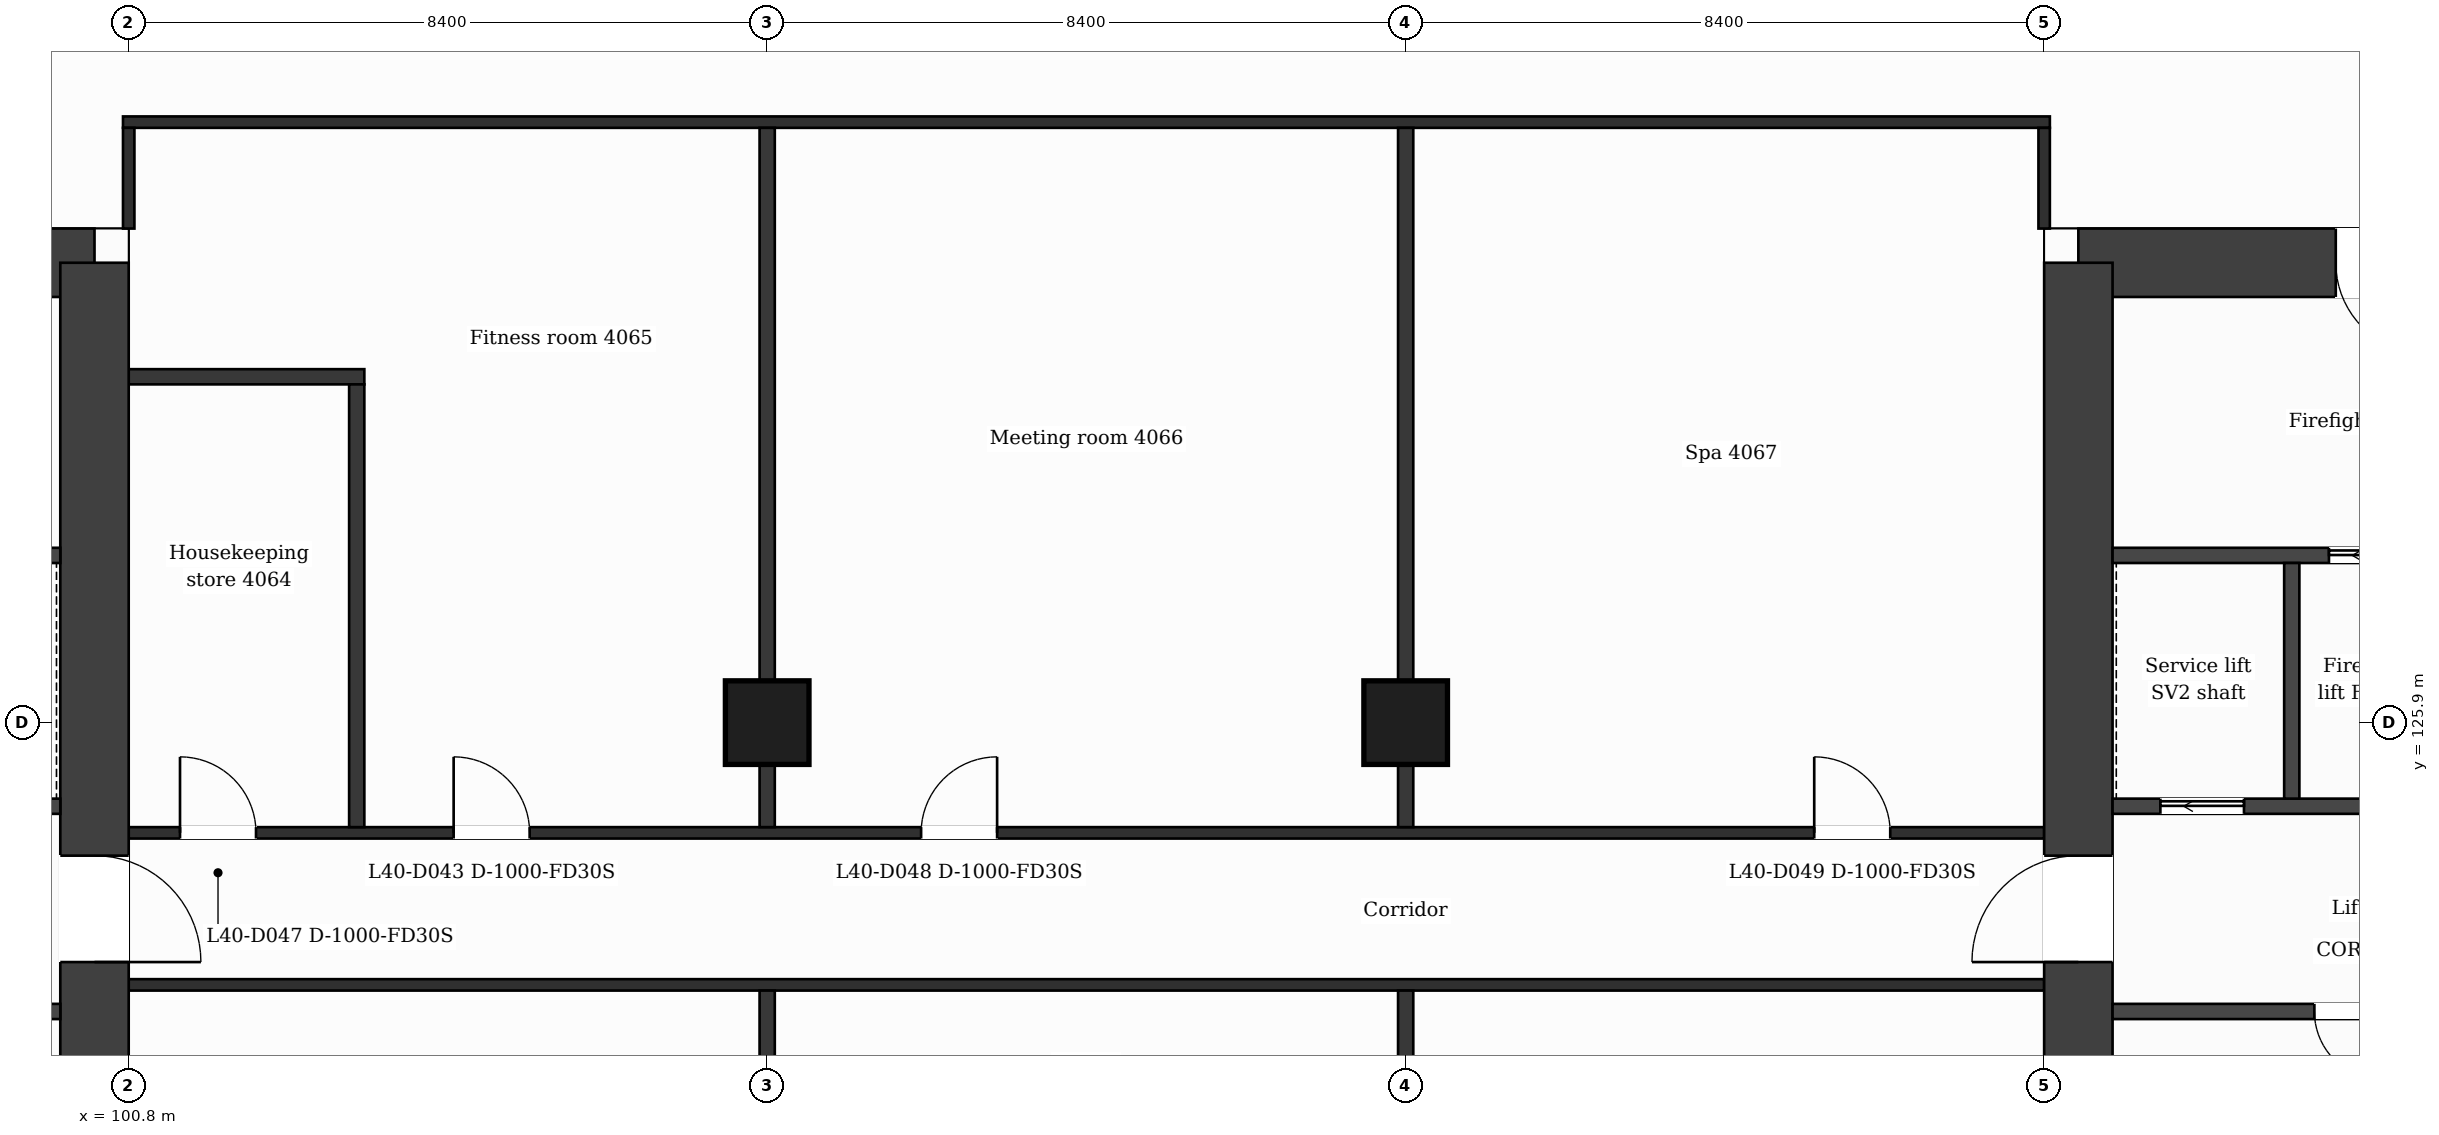
"""IFC4 building model, lengths in metres.
Left out: names, types, materials, properties, quantities, classifications, styles, units other than length and angle.
Written with IfcOpenShell. Run it as: python <this file> out.ifc"""

import sys

from ifc_helpers import new_model, si_unit, direction, frame, frame_2d, origin, origin_2d, place, context, subcontext, project, spatial, rectangle, extrude, element, fill, save


model = new_model("IFC4")
c1 = context("Model", 3, precision=1e-05, world=origin(), true_north=direction((0.0, 1.0)))
c2 = subcontext(c1, "Body", "Model", "MODEL_VIEW")
j1 = project(units=[si_unit("LENGTHUNIT", "METRE"), si_unit("PLANEANGLEUNIT", "RADIAN")], contexts=[c1])
p1 = place(None, origin())
s1 = spatial("IfcSite", under=j1, at=p1, CompositionType="ELEMENT")
p2 = place(p1, origin())
s2 = spatial("IfcBuilding", under=s1, at=p2, CompositionType="ELEMENT")
p3 = place(p2, frame((0.0, 0.0, 170.0)))
s3 = spatial("IfcBuildingStorey", under=s2, at=p3, CompositionType="ELEMENT", Elevation=170.0)
p4 = place(p3, frame((89.024, 131.95, 0.0), z_axis=(0.0, 0.0, 1.0), x_axis=(1.0, 0.0, 0.0)))
e1 = element("IfcWall", 1, at=p4, inside=s3, PredefinedType="SHEAR", context=c2, shape_type="SweptSolid", body=[
    extrude(rectangle(XDim=11.326, YDim=0.9, at=frame_2d((5.663, 0.0))), origin(), (0.0, 0.0, 1.0), 3.7),
])
p5 = place(p4, frame((6.739, 0.0, 0.0)))
e2 = element("IfcOpeningElement", 2, at=p5, cuts=e1, PredefinedType="OPENING", context=c2, shape_type="SweptSolid", body=[
    extrude(rectangle(XDim=1.2, YDim=2.1, at=frame_2d((0.6, 1.05))), frame((0.0, 0.46, 0.0), z_axis=(0.0, -1.0, 0.0), x_axis=(1.0, 0.0, 0.0)), (0.0, 0.0, 1.0), 0.92),
])
p6 = place(p3, frame((100.35, 131.95, 0.0), z_axis=(0.0, 0.0, 1.0), x_axis=(0.0, -1.0, 0.0)))
e3 = element("IfcWall", 3, at=p6, inside=s3, PredefinedType="SHEAR", context=c2, shape_type="SweptSolid", body=[
    extrude(rectangle(XDim=21.1, YDim=0.9, at=frame_2d((10.55, 0.0))), origin(), (0.0, 0.0, 1.0), 3.7),
])
p7 = place(p6, frame((7.8, 0.0, 0.0)))
e4 = element("IfcOpeningElement", 4, at=p7, cuts=e3, PredefinedType="OPENING", context=c2, shape_type="SweptSolid", body=[
    extrude(rectangle(XDim=1.4, YDim=2.1, at=frame_2d((0.7, 1.05))), frame((0.0, 0.46, 0.0), z_axis=(0.0, -1.0, 0.0), x_axis=(1.0, 0.0, 0.0)), (0.0, 0.0, 1.0), 0.92),
])
p8 = place(p3, frame((126.45, 131.95, 0.0), z_axis=(0.0, 0.0, 1.0), x_axis=(1.0, 0.0, 0.0)))
e5 = element("IfcWall", 5, at=p8, inside=s3, PredefinedType="SHEAR", context=c2, shape_type="SweptSolid", body=[
    extrude(rectangle(XDim=11.326, YDim=0.9, at=frame_2d((5.663, 0.0))), origin(), (0.0, 0.0, 1.0), 3.7),
])
p9 = place(p8, frame((3.386, 0.0, 0.0)))
e6 = element("IfcOpeningElement", 6, at=p9, cuts=e5, PredefinedType="OPENING", context=c2, shape_type="SweptSolid", body=[
    extrude(rectangle(XDim=1.2, YDim=2.1, at=frame_2d((0.6, 1.05))), frame((0.0, 0.46, 0.0), z_axis=(0.0, -1.0, 0.0), x_axis=(1.0, 0.0, 0.0)), (0.0, 0.0, 1.0), 0.92),
])
p10 = place(p3, frame((126.45, 110.85, 0.0), z_axis=(0.0, 0.0, 1.0), x_axis=(0.0, 1.0, 0.0)))
e7 = element("IfcWall", 7, at=p10, inside=s3, PredefinedType="SHEAR", context=c2, shape_type="SweptSolid", body=[
    extrude(rectangle(XDim=21.1, YDim=0.9, at=frame_2d((10.55, 0.0))), origin(), (0.0, 0.0, 1.0), 3.7),
])
p11 = place(p10, frame((11.9, 0.0, 0.0)))
e8 = element("IfcOpeningElement", 8, at=p11, cuts=e7, PredefinedType="OPENING", context=c2, shape_type="SweptSolid", body=[
    extrude(rectangle(XDim=1.4, YDim=2.1, at=frame_2d((0.7, 1.05))), frame((0.0, 0.46, 0.0), z_axis=(0.0, -1.0, 0.0), x_axis=(1.0, 0.0, 0.0)), (0.0, 0.0, 1.0), 0.92),
])
for number, where, z_axis, x_axis in (
    (9, (109.2, 125.9, 0.0), (0.0, 0.0, 1.0), (1.0, 0.0, 0.0)),
    (10, (117.6, 125.9, 0.0), (0.0, 0.0, 1.0), (1.0, 0.0, 0.0)),
):
    element("IfcColumn", number, at=place(p3, frame(where, z_axis=z_axis, x_axis=x_axis)), inside=s3, PredefinedType="COLUMN", context=c2, shape_type="SweptSolid", body=[
        extrude(rectangle(XDim=1.1, YDim=1.1, at=origin_2d()), origin(), (0.0, 0.0, 1.0), 3.7),
    ])
p12 = place(p3, frame((95.227, 122.1, 0.0), z_axis=(0.0, 0.0, 1.0), x_axis=(1.0, 0.0, 0.0)))
e11 = element("IfcWall", 11, at=p12, inside=s3, PredefinedType="PARTITIONING", context=c2, shape_type="SweptSolid", body=[
    extrude(rectangle(XDim=4.673, YDim=0.2, at=frame_2d((2.336, 0.0))), origin(), (0.0, 0.0, 1.0), 3.38),
])
p13 = place(p12, frame((2.655, 0.0, 0.0)))
e12 = element("IfcOpeningElement", 12, at=p13, cuts=e11, PredefinedType="OPENING", context=c2, shape_type="SweptSolid", body=[
    extrude(rectangle(XDim=0.9, YDim=2.1, at=frame_2d((0.45, 1.05))), frame((0.0, 0.11, 0.0), z_axis=(0.0, -1.0, 0.0), x_axis=(1.0, 0.0, 0.0)), (0.0, 0.0, 1.0), 0.22),
])
p14 = place(p3, frame((126.9, 122.1, 0.0), z_axis=(0.0, 0.0, 1.0), x_axis=(1.0, 0.0, 0.0)))
e13 = element("IfcWall", 13, at=p14, inside=s3, PredefinedType="PARTITIONING", context=c2, shape_type="SweptSolid", body=[
    extrude(rectangle(XDim=4.673, YDim=0.2, at=frame_2d((2.336, 0.0))), origin(), (0.0, 0.0, 1.0), 3.38),
])
p15 = place(p14, frame((2.655, 0.0, 0.0)))
e14 = element("IfcOpeningElement", 14, at=p15, cuts=e13, PredefinedType="OPENING", context=c2, shape_type="SweptSolid", body=[
    extrude(rectangle(XDim=0.9, YDim=2.1, at=frame_2d((0.45, 1.05))), frame((0.0, 0.11, 0.0), z_axis=(0.0, -1.0, 0.0), x_axis=(1.0, 0.0, 0.0)), (0.0, 0.0, 1.0), 0.22),
])
p16 = place(p3, frame((100.8, 122.45, 0.0), z_axis=(0.0, 0.0, 1.0), x_axis=(1.0, 0.0, 0.0)))
e15 = element("IfcWall", 15, at=p16, inside=s3, PredefinedType="PARTITIONING", context=c2, shape_type="SweptSolid", body=[
    extrude(rectangle(XDim=25.2, YDim=0.15, at=frame_2d((12.6, 0.0))), origin(), (0.0, 0.0, 1.0), 3.38),
])
p17 = place(p3, frame((100.8, 124.45, 0.0), z_axis=(0.0, 0.0, 1.0), x_axis=(1.0, 0.0, 0.0)))
e16 = element("IfcWall", 16, at=p17, inside=s3, PredefinedType="PARTITIONING", context=c2, shape_type="SweptSolid", body=[
    extrude(rectangle(XDim=25.2, YDim=0.15, at=frame_2d((12.6, 0.0))), origin(), (0.0, 0.0, 1.0), 3.38),
])
p18 = place(p17, frame((4.275, 0.0, 0.0)))
e17 = element("IfcOpeningElement", 17, at=p18, cuts=e16, PredefinedType="OPENING", context=c2, shape_type="SweptSolid", body=[
    extrude(rectangle(XDim=1.0, YDim=2.1, at=frame_2d((0.5, 1.05))), frame((0.0, 0.085, 0.0), z_axis=(0.0, -1.0, 0.0), x_axis=(1.0, 0.0, 0.0)), (0.0, 0.0, 1.0), 0.17),
])
p19 = place(p17, frame((0.675, 0.0, 0.0)))
e18 = element("IfcOpeningElement", 18, at=p19, cuts=e16, PredefinedType="OPENING", context=c2, shape_type="SweptSolid", body=[
    extrude(rectangle(XDim=1.0, YDim=2.1, at=frame_2d((0.5, 1.05))), frame((0.0, 0.085, 0.0), z_axis=(0.0, -1.0, 0.0), x_axis=(1.0, 0.0, 0.0)), (0.0, 0.0, 1.0), 0.17),
])
p20 = place(p17, frame((10.425, 0.0, 0.0)))
e19 = element("IfcOpeningElement", 19, at=p20, cuts=e16, PredefinedType="OPENING", context=c2, shape_type="SweptSolid", body=[
    extrude(rectangle(XDim=1.0, YDim=2.1, at=frame_2d((0.5, 1.05))), frame((0.0, 0.085, 0.0), z_axis=(0.0, -1.0, 0.0), x_axis=(1.0, 0.0, 0.0)), (0.0, 0.0, 1.0), 0.17),
])
p21 = place(p17, frame((22.175, 0.0, 0.0)))
e20 = element("IfcOpeningElement", 20, at=p21, cuts=e16, PredefinedType="OPENING", context=c2, shape_type="SweptSolid", body=[
    extrude(rectangle(XDim=1.0, YDim=2.1, at=frame_2d((0.5, 1.05))), frame((0.0, 0.085, 0.0), z_axis=(0.0, -1.0, 0.0), x_axis=(1.0, 0.0, 0.0)), (0.0, 0.0, 1.0), 0.17),
])
p22 = place(p3, frame((92.702, 124.8, 0.0), z_axis=(0.0, 0.0, 1.0), x_axis=(1.0, 0.0, 0.0)))
e21 = element("IfcWall", 21, at=p22, inside=s3, PredefinedType="PARTITIONING", context=c2, shape_type="SweptSolid", body=[
    extrude(rectangle(XDim=7.198, YDim=0.2, at=frame_2d((3.599, 0.0))), origin(), (0.0, 0.0, 1.0), 3.38),
])
p23 = place(p22, frame((5.469, 0.0, 0.0)))
e22 = element("IfcOpeningElement", 22, at=p23, cuts=e21, PredefinedType="OPENING", context=c2, shape_type="SweptSolid", body=[
    extrude(rectangle(XDim=1.1, YDim=2.1, at=frame_2d((0.55, 1.05))), frame((0.0, 0.11, 0.0), z_axis=(0.0, -1.0, 0.0), x_axis=(1.0, 0.0, 0.0)), (0.0, 0.0, 1.0), 0.22),
])
p24 = place(p3, frame((126.9, 124.8, 0.0), z_axis=(0.0, 0.0, 1.0), x_axis=(1.0, 0.0, 0.0)))
e23 = element("IfcWall", 23, at=p24, inside=s3, PredefinedType="PARTITIONING", context=c2, shape_type="SweptSolid", body=[
    extrude(rectangle(XDim=4.715, YDim=0.2, at=frame_2d((2.358, 0.0))), origin(), (0.0, 0.0, 1.0), 3.38),
])
p25 = place(p24, frame((0.629, 0.0, 0.0)))
e24 = element("IfcOpeningElement", 24, at=p25, cuts=e23, PredefinedType="OPENING", context=c2, shape_type="SweptSolid", body=[
    extrude(rectangle(XDim=1.1, YDim=2.1, at=frame_2d((0.55, 1.05))), frame((0.0, 0.11, 0.0), z_axis=(0.0, -1.0, 0.0), x_axis=(1.0, 0.0, 0.0)), (0.0, 0.0, 1.0), 0.22),
])
p26 = place(p3, frame((92.827, 128.1, 0.0), z_axis=(0.0, 0.0, 1.0), x_axis=(1.0, 0.0, 0.0)))
e25 = element("IfcWall", 25, at=p26, inside=s3, PredefinedType="PARTITIONING", context=c2, shape_type="SweptSolid", body=[
    extrude(rectangle(XDim=7.073, YDim=0.2, at=frame_2d((3.537, 0.0))), origin(), (0.0, 0.0, 1.0), 3.38),
])
p27 = place(p26, frame((2.931, 0.0, 0.0)))
e26 = element("IfcOpeningElement", 26, at=p27, cuts=e25, PredefinedType="OPENING", context=c2, shape_type="SweptSolid", body=[
    extrude(rectangle(XDim=1.1, YDim=2.1, at=frame_2d((0.55, 1.05))), frame((0.0, 0.11, 0.0), z_axis=(0.0, -1.0, 0.0), x_axis=(1.0, 0.0, 0.0)), (0.0, 0.0, 1.0), 0.22),
])
p28 = place(p3, frame((126.9, 128.1, 0.0), z_axis=(0.0, 0.0, 1.0), x_axis=(1.0, 0.0, 0.0)))
e27 = element("IfcWall", 27, at=p28, inside=s3, PredefinedType="PARTITIONING", context=c2, shape_type="SweptSolid", body=[
    extrude(rectangle(XDim=4.715, YDim=0.2, at=frame_2d((2.358, 0.0))), origin(), (0.0, 0.0, 1.0), 3.38),
])
p29 = place(p28, frame((2.847, 0.0, 0.0)))
e28 = element("IfcOpeningElement", 28, at=p29, cuts=e27, PredefinedType="OPENING", context=c2, shape_type="SweptSolid", body=[
    extrude(rectangle(XDim=1.1, YDim=2.1, at=frame_2d((0.55, 1.05))), frame((0.0, 0.11, 0.0), z_axis=(0.0, -1.0, 0.0), x_axis=(1.0, 0.0, 0.0)), (0.0, 0.0, 1.0), 0.22),
])
p30 = place(p3, frame((100.8, 130.45, 0.0), z_axis=(0.0, 0.0, 1.0), x_axis=(1.0, 0.0, 0.0)))
e29 = element("IfcWall", 29, at=p30, inside=s3, PredefinedType="PARTITIONING", context=c2, shape_type="SweptSolid", body=[
    extrude(rectangle(XDim=3.1, YDim=0.2, at=frame_2d((1.55, 0.0))), origin(), (0.0, 0.0, 1.0), 3.38),
])
p31 = place(p3, frame((100.725, 133.8, 0.0), z_axis=(0.0, 0.0, 1.0), x_axis=(1.0, 0.0, 0.0)))
e30 = element("IfcWall", 30, at=p31, inside=s3, PredefinedType="PARTITIONING", context=c2, shape_type="SweptSolid", body=[
    extrude(rectangle(XDim=25.35, YDim=0.15, at=frame_2d((12.675, 0.0))), origin(), (0.0, 0.0, 1.0), 3.38),
])
p32 = place(p3, frame((100.8, 132.4, 0.0), z_axis=(0.0, 0.0, 1.0), x_axis=(0.0, 1.0, 0.0)))
e31 = element("IfcWall", 31, at=p32, inside=s3, PredefinedType="PARTITIONING", context=c2, shape_type="SweptSolid", body=[
    extrude(rectangle(XDim=1.325, YDim=0.15, at=frame_2d((0.663, 0.0))), origin(), (0.0, 0.0, 1.0), 3.38),
])
p33 = place(p3, frame((103.8, 124.525, 0.0), z_axis=(0.0, 0.0, 1.0), x_axis=(0.0, 1.0, 0.0)))
e32 = element("IfcWall", 32, at=p33, inside=s3, PredefinedType="PARTITIONING", context=c2, shape_type="SweptSolid", body=[
    extrude(rectangle(XDim=5.825, YDim=0.2, at=frame_2d((2.913, 0.0))), origin(), (0.0, 0.0, 1.0), 3.38),
])
p34 = place(p3, frame((109.2, 109.075, 0.0), z_axis=(0.0, 0.0, 1.0), x_axis=(0.0, 1.0, 0.0)))
e33 = element("IfcWall", 33, at=p34, inside=s3, PredefinedType="PARTITIONING", context=c2, shape_type="SweptSolid", body=[
    extrude(rectangle(XDim=13.3, YDim=0.2, at=frame_2d((6.65, 0.0))), origin(), (0.0, 0.0, 1.0), 3.38),
])
p35 = place(p3, frame((109.2, 124.525, 0.0), z_axis=(0.0, 0.0, 1.0), x_axis=(0.0, 1.0, 0.0)))
e34 = element("IfcWall", 34, at=p35, inside=s3, PredefinedType="PARTITIONING", context=c2, shape_type="SweptSolid", body=[
    extrude(rectangle(XDim=9.2, YDim=0.2, at=frame_2d((4.6, 0.0))), origin(), (0.0, 0.0, 1.0), 3.38),
])
p36 = place(p3, frame((117.6, 109.075, 0.0), z_axis=(0.0, 0.0, 1.0), x_axis=(0.0, 1.0, 0.0)))
e35 = element("IfcWall", 35, at=p36, inside=s3, PredefinedType="PARTITIONING", context=c2, shape_type="SweptSolid", body=[
    extrude(rectangle(XDim=13.3, YDim=0.2, at=frame_2d((6.65, 0.0))), origin(), (0.0, 0.0, 1.0), 3.38),
])
p37 = place(p3, frame((117.6, 124.525, 0.0), z_axis=(0.0, 0.0, 1.0), x_axis=(0.0, 1.0, 0.0)))
e36 = element("IfcWall", 36, at=p37, inside=s3, PredefinedType="PARTITIONING", context=c2, shape_type="SweptSolid", body=[
    extrude(rectangle(XDim=9.2, YDim=0.2, at=frame_2d((4.6, 0.0))), origin(), (0.0, 0.0, 1.0), 3.38),
])
p38 = place(p3, frame((126.0, 132.4, 0.0), z_axis=(0.0, 0.0, 1.0), x_axis=(0.0, 1.0, 0.0)))
e37 = element("IfcWall", 37, at=p38, inside=s3, PredefinedType="PARTITIONING", context=c2, shape_type="SweptSolid", body=[
    extrude(rectangle(XDim=1.325, YDim=0.15, at=frame_2d((0.663, 0.0))), origin(), (0.0, 0.0, 1.0), 3.38),
])
p39 = place(p3, frame((129.258, 124.9, 0.0), z_axis=(0.0, 0.0, 1.0), x_axis=(0.0, 1.0, 0.0)))
e38 = element("IfcWall", 38, at=p39, inside=s3, PredefinedType="PARTITIONING", context=c2, shape_type="SweptSolid", body=[
    extrude(rectangle(XDim=3.1, YDim=0.2, at=frame_2d((1.55, 0.0))), origin(), (0.0, 0.0, 1.0), 3.38),
])
p40 = place(p29, origin())
e39 = element("IfcDoor", 39, at=p40, inside=s3, OperationType="SLIDING_TO_LEFT", PredefinedType="DOOR", context=c2, shape_type="SweptSolid", body=[
    extrude(rectangle(XDim=1.1, YDim=2.1, at=frame_2d((0.55, 1.05))), frame((0.0, 0.025, 0.0), z_axis=(0.0, -1.0, 0.0), x_axis=(1.0, 0.0, 0.0)), (0.0, 0.0, 1.0), 0.05),
])
fill(e28, e39)
p41 = place(p25, origin())
e40 = element("IfcDoor", 40, at=p41, inside=s3, OperationType="SLIDING_TO_LEFT", PredefinedType="DOOR", context=c2, shape_type="SweptSolid", body=[
    extrude(rectangle(XDim=1.1, YDim=2.1, at=frame_2d((0.55, 1.05))), frame((0.0, 0.025, 0.0), z_axis=(0.0, -1.0, 0.0), x_axis=(1.0, 0.0, 0.0)), (0.0, 0.0, 1.0), 0.05),
])
fill(e24, e40)
p42 = place(p15, origin())
e41 = element("IfcDoor", 41, at=p42, inside=s3, OperationType="SINGLE_SWING_RIGHT", PredefinedType="DOOR", context=c2, shape_type="SweptSolid", body=[
    extrude(rectangle(XDim=0.9, YDim=2.1, at=frame_2d((0.45, 1.05))), frame((0.0, 0.025, 0.0), z_axis=(0.0, -1.0, 0.0), x_axis=(1.0, 0.0, 0.0)), (0.0, 0.0, 1.0), 0.05),
])
fill(e14, e41)
p43 = place(p18, origin())
e42 = element("IfcDoor", 42, at=p43, inside=s3, OperationType="SINGLE_SWING_LEFT", PredefinedType="DOOR", context=c2, shape_type="SweptSolid", body=[
    extrude(rectangle(XDim=1.0, YDim=2.1, at=frame_2d((0.5, 1.05))), frame((0.0, 0.025, 0.0), z_axis=(0.0, -1.0, 0.0), x_axis=(1.0, 0.0, 0.0)), (0.0, 0.0, 1.0), 0.05),
])
fill(e17, e42)
p44 = place(p19, origin())
e43 = element("IfcDoor", 43, at=p44, inside=s3, OperationType="SINGLE_SWING_LEFT", PredefinedType="DOOR", context=c2, shape_type="SweptSolid", body=[
    extrude(rectangle(XDim=1.0, YDim=2.1, at=frame_2d((0.5, 1.05))), frame((0.0, 0.025, 0.0), z_axis=(0.0, -1.0, 0.0), x_axis=(1.0, 0.0, 0.0)), (0.0, 0.0, 1.0), 0.05),
])
fill(e18, e43)
p45 = place(p20, origin())
e44 = element("IfcDoor", 44, at=p45, inside=s3, OperationType="SINGLE_SWING_RIGHT", PredefinedType="DOOR", context=c2, shape_type="SweptSolid", body=[
    extrude(rectangle(XDim=1.0, YDim=2.1, at=frame_2d((0.5, 1.05))), frame((0.0, 0.025, 0.0), z_axis=(0.0, -1.0, 0.0), x_axis=(1.0, 0.0, 0.0)), (0.0, 0.0, 1.0), 0.05),
])
fill(e19, e44)
p46 = place(p21, origin())
e45 = element("IfcDoor", 45, at=p46, inside=s3, OperationType="SINGLE_SWING_LEFT", PredefinedType="DOOR", context=c2, shape_type="SweptSolid", body=[
    extrude(rectangle(XDim=1.0, YDim=2.1, at=frame_2d((0.5, 1.05))), frame((0.0, 0.025, 0.0), z_axis=(0.0, -1.0, 0.0), x_axis=(1.0, 0.0, 0.0)), (0.0, 0.0, 1.0), 0.05),
])
fill(e20, e45)
p47 = place(p7, origin())
e46 = element("IfcDoor", 46, at=p47, inside=s3, OperationType="SINGLE_SWING_RIGHT", PredefinedType="DOOR", context=c2, shape_type="SweptSolid", body=[
    extrude(rectangle(XDim=1.4, YDim=2.1, at=frame_2d((0.7, 1.05))), frame((0.0, 0.025, 0.0), z_axis=(0.0, -1.0, 0.0), x_axis=(1.0, 0.0, 0.0)), (0.0, 0.0, 1.0), 0.05),
])
fill(e4, e46)
p48 = place(p9, origin())
e47 = element("IfcDoor", 47, at=p48, inside=s3, OperationType="SINGLE_SWING_RIGHT", PredefinedType="DOOR", context=c2, shape_type="SweptSolid", body=[
    extrude(rectangle(XDim=1.2, YDim=2.1, at=frame_2d((0.6, 1.05))), frame((0.0, 0.025, 0.0), z_axis=(0.0, -1.0, 0.0), x_axis=(1.0, 0.0, 0.0)), (0.0, 0.0, 1.0), 0.05),
])
fill(e6, e47)
p49 = place(p11, origin())
e48 = element("IfcDoor", 48, at=p49, inside=s3, OperationType="SINGLE_SWING_LEFT", PredefinedType="DOOR", context=c2, shape_type="SweptSolid", body=[
    extrude(rectangle(XDim=1.4, YDim=2.1, at=frame_2d((0.7, 1.05))), frame((0.0, 0.025, 0.0), z_axis=(0.0, -1.0, 0.0), x_axis=(1.0, 0.0, 0.0)), (0.0, 0.0, 1.0), 0.05),
])
fill(e8, e48)
save(model, sys.argv[1])
